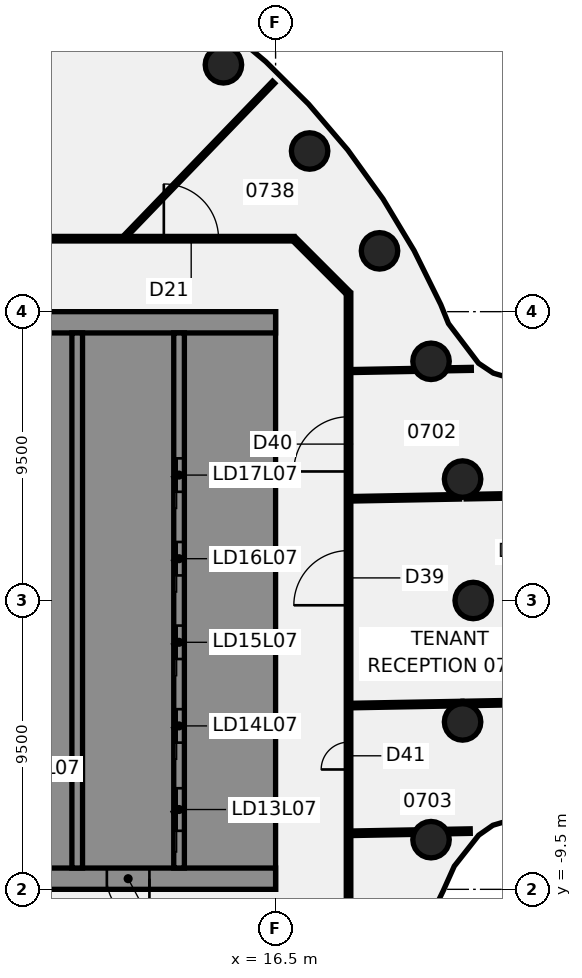
"""IFC4 building model, lengths in metres.
Left out: names, types, materials, properties, quantities, classifications, styles, units other than length and angle.
Written with IfcOpenShell. Run it as: python <this file> out.ifc"""

import sys

from ifc_helpers import new_model, si_unit, direction, frame, frame_2d, origin, origin_2d, place, context, subcontext, project, spatial, polyline, rectangle, circle, outline, extrude, element, fill, save


model = new_model("IFC4")
c1 = context("Model", 3, precision=1e-05, world=origin(), true_north=direction((0.0, 1.0)))
c2 = subcontext(c1, "Body", "Model", "MODEL_VIEW")
j1 = project(units=[si_unit("LENGTHUNIT", "METRE"), si_unit("PLANEANGLEUNIT", "RADIAN")], contexts=[c1])
p1 = place(None, origin())
s1 = spatial("IfcSite", under=j1, at=p1, CompositionType="ELEMENT")
p2 = place(p1, origin())
s2 = spatial("IfcBuilding", under=s1, at=p2, CompositionType="ELEMENT")
p3 = place(p2, frame((0.0, 0.0, 37.75)))
s3 = spatial("IfcBuildingStorey", under=s2, at=p3, CompositionType="ELEMENT", Elevation=37.75)
for number, where, z_axis, x_axis in (
    (1, (23.0, 0.0, -0.14), (0.0, 0.0, 1.0), (1.0, 0.0, 0.0)),
    (2, (22.651, 3.994, -0.14), (0.0, 0.0, 1.0), (1.0, 0.0, 0.0)),
    (3, (21.613, 7.866, -0.14), (0.0, 0.0, 1.0), (1.0, 0.0, 0.0)),
    (4, (19.919, 11.5, -0.14), (0.0, 0.0, 1.0), (1.0, 0.0, 0.0)),
    (5, (17.619, 14.784, -0.14), (0.0, 0.0, 1.0), (1.0, 0.0, 0.0)),
    (6, (14.784, 17.619, -0.14), (0.0, 0.0, 1.0), (1.0, 0.0, 0.0)),
    (7, (21.613, -7.866, -0.14), (0.0, 0.0, 1.0), (1.0, 0.0, 0.0)),
    (8, (22.651, -3.994, -0.14), (0.0, 0.0, 1.0), (1.0, 0.0, 0.0)),
):
    element("IfcColumn", number, at=place(p3, frame(where, z_axis=z_axis, x_axis=x_axis)), inside=s3, PredefinedType="COLUMN", context=c2, shape_type="SweptSolid", body=[
        extrude(circle(Radius=0.6, at=origin_2d()), origin(), (0.0, 0.0, 1.0), 3.75),
    ])
p4 = place(p3, frame((17.128, 11.872, 0.0), z_axis=(0.0, 0.0, 1.0), x_axis=(0.707106781187, -0.707106781187, 0.0)))
e9 = element("IfcWall", 9, at=p4, inside=s3, PredefinedType="PARTITIONING", context=c2, shape_type="SweptSolid", body=[
    extrude(rectangle(XDim=2.465, YDim=0.15, at=frame_2d((1.232, 0.0))), origin(), (0.0, 0.0, 1.0), 3.01),
])
p5 = place(p3, frame((-17.065, 11.9, 0.0), z_axis=(0.0, 0.0, 1.0), x_axis=(1.0, 0.0, 0.0)))
e10 = element("IfcWall", 10, at=p5, inside=s3, PredefinedType="PARTITIONING", context=c2, shape_type="SweptSolid", body=[
    extrude(rectangle(XDim=34.165, YDim=0.15, at=frame_2d((17.083, 0.0))), origin(), (0.0, 0.0, 1.0), 3.01),
])
p6 = place(p5, frame((16.399, 0.0, 0.0)))
e11 = element("IfcOpeningElement", 11, at=p6, cuts=e10, PredefinedType="OPENING", context=c2, shape_type="SweptSolid", body=[
    extrude(rectangle(XDim=1.8, YDim=2.1, at=frame_2d((0.9, 1.05))), frame((0.0, 0.085, 0.0), z_axis=(0.0, -1.0, 0.0), x_axis=(1.0, 0.0, 0.0)), (0.0, 0.0, 1.0), 0.17),
])
p7 = place(p5, frame((29.889, 0.0, 0.0)))
e12 = element("IfcOpeningElement", 12, at=p7, cuts=e10, PredefinedType="OPENING", context=c2, shape_type="SweptSolid", body=[
    extrude(rectangle(XDim=1.8, YDim=2.1, at=frame_2d((0.9, 1.05))), frame((0.0, 0.085, 0.0), z_axis=(0.0, -1.0, 0.0), x_axis=(1.0, 0.0, 0.0)), (0.0, 0.0, 1.0), 0.17),
])
p8 = place(p5, frame((6.823, 0.0, 0.0)))
e13 = element("IfcOpeningElement", 13, at=p8, cuts=e10, PredefinedType="OPENING", context=c2, shape_type="SweptSolid", body=[
    extrude(rectangle(XDim=1.8, YDim=2.1, at=frame_2d((0.9, 1.05))), frame((0.0, 0.085, 0.0), z_axis=(0.0, -1.0, 0.0), x_axis=(1.0, 0.0, 0.0)), (0.0, 0.0, 1.0), 0.17),
])
p9 = place(p3, frame((18.96, -3.456, 0.0), z_axis=(0.0, 0.0, 1.0), x_axis=(0.999834091985, 0.01821506258, 0.0)))
e14 = element("IfcWall", 14, at=p9, inside=s3, PredefinedType="PARTITIONING", context=c2, shape_type="SweptSolid", body=[
    extrude(rectangle(XDim=3.672, YDim=0.15, at=frame_2d((1.836, 0.0))), origin(), (0.0, 0.0, 1.0), 3.01),
])
p10 = place(p3, frame((22.667, -3.388, 0.0), z_axis=(0.0, 0.0, 1.0), x_axis=(0.999834076392, 0.018215918464, 0.0)))
e15 = element("IfcWall", 15, at=p10, inside=s3, PredefinedType="PARTITIONING", context=c2, shape_type="SweptSolid", body=[
    extrude(rectangle(XDim=3.109, YDim=0.15, at=frame_2d((1.555, 0.0))), origin(), (0.0, 0.0, 1.0), 3.01),
])
p11 = place(p3, frame((18.96, 3.345, 0.0), z_axis=(0.0, 0.0, 1.0), x_axis=(0.999833986919, 0.018220828811, 0.0)))
e16 = element("IfcWall", 16, at=p11, inside=s3, PredefinedType="PARTITIONING", context=c2, shape_type="SweptSolid", body=[
    extrude(rectangle(XDim=3.591, YDim=0.15, at=frame_2d((1.795, 0.0))), origin(), (0.0, 0.0, 1.0), 3.01),
])
p12 = place(p3, frame((22.765, 3.415, 0.0), z_axis=(0.0, 0.0, 1.0), x_axis=(0.999834723768, 0.01818035061, 0.0)))
e17 = element("IfcWall", 17, at=p12, inside=s3, PredefinedType="PARTITIONING", context=c2, shape_type="SweptSolid", body=[
    extrude(rectangle(XDim=2.887, YDim=0.15, at=frame_2d((1.444, 0.0))), origin(), (0.0, 0.0, 1.0), 3.01),
])
p13 = place(p3, frame((18.96, 7.546, 0.0), z_axis=(0.0, 0.0, 1.0), x_axis=(0.999836384885, 0.018088766124, 0.0)))
e18 = element("IfcWall", 18, at=p13, inside=s3, PredefinedType="PARTITIONING", context=c2, shape_type="SweptSolid", body=[
    extrude(rectangle(XDim=2.119, YDim=0.1, at=frame_2d((1.06, 0.0))), origin(), (0.0, 0.0, 1.0), 3.01),
])
p14 = place(p3, frame((22.153, 7.604, 0.0), z_axis=(0.0, 0.0, 1.0), x_axis=(0.999837513229, 0.01802629026, 0.0)))
e19 = element("IfcWall", 19, at=p14, inside=s3, PredefinedType="PARTITIONING", context=c2, shape_type="SweptSolid", body=[
    extrude(rectangle(XDim=0.786, YDim=0.1, at=frame_2d((0.393, 0.0))), origin(), (0.0, 0.0, 1.0), 3.01),
])
p15 = place(p3, frame((18.96, -7.657, 0.0), z_axis=(0.0, 0.0, 1.0), x_axis=(0.999832834064, 0.018283980067, 0.0)))
e20 = element("IfcWall", 20, at=p15, inside=s3, PredefinedType="PARTITIONING", context=c2, shape_type="SweptSolid", body=[
    extrude(rectangle(XDim=2.11, YDim=0.15, at=frame_2d((1.055, 0.0))), origin(), (0.0, 0.0, 1.0), 3.01),
])
p16 = place(p3, frame((22.151, -7.599, 0.0), z_axis=(0.0, 0.0, 1.0), x_axis=(0.999834536949, 0.018190621855, 0.0)))
e21 = element("IfcWall", 21, at=p16, inside=s3, PredefinedType="PARTITIONING", context=c2, shape_type="SweptSolid", body=[
    extrude(rectangle(XDim=0.752, YDim=0.15, at=frame_2d((0.376, 0.0))), origin(), (0.0, 0.0, 1.0), 3.01),
])
p17 = place(p3, frame((11.565, 11.993, 0.0), z_axis=(0.0, 0.0, 1.0), x_axis=(0.694132350754, 0.719847400243, 0.0)))
e22 = element("IfcWall", 22, at=p17, inside=s3, PredefinedType="PARTITIONING", context=c2, shape_type="SweptSolid", body=[
    extrude(rectangle(XDim=7.016, YDim=0.1, at=frame_2d((3.508, 0.0))), origin(), (0.0, 0.0, 1.0), 3.01),
])
p18 = place(p3, frame((18.9, -10.1, 0.0), z_axis=(0.0, 0.0, 1.0), x_axis=(0.0, 1.0, 0.0)))
e23 = element("IfcWall", 23, at=p18, inside=s3, PredefinedType="PARTITIONING", context=c2, shape_type="SweptSolid", body=[
    extrude(rectangle(XDim=20.2, YDim=0.15, at=frame_2d((10.1, 0.0))), origin(), (0.0, 0.0, 1.0), 3.01),
])
p19 = place(p18, frame((9.943, 0.0, 0.0)))
e24 = element("IfcOpeningElement", 24, at=p19, cuts=e23, PredefinedType="OPENING", context=c2, shape_type="SweptSolid", body=[
    extrude(rectangle(XDim=1.8, YDim=2.1, at=frame_2d((0.9, 1.05))), frame((0.0, 0.085, 0.0), z_axis=(0.0, -1.0, 0.0), x_axis=(1.0, 0.0, 0.0)), (0.0, 0.0, 1.0), 0.17),
])
p20 = place(p18, frame((14.344, 0.0, 0.0)))
e25 = element("IfcOpeningElement", 25, at=p20, cuts=e23, PredefinedType="OPENING", context=c2, shape_type="SweptSolid", body=[
    extrude(rectangle(XDim=1.8, YDim=2.1, at=frame_2d((0.9, 1.05))), frame((0.0, 0.085, 0.0), z_axis=(0.0, -1.0, 0.0), x_axis=(1.0, 0.0, 0.0)), (0.0, 0.0, 1.0), 0.17),
])
p21 = place(p18, frame((4.542, 0.0, 0.0)))
e26 = element("IfcOpeningElement", 26, at=p21, cuts=e23, PredefinedType="OPENING", context=c2, shape_type="SweptSolid", body=[
    extrude(rectangle(XDim=0.9, YDim=2.1, at=frame_2d((0.45, 1.05))), frame((0.0, 0.085, 0.0), z_axis=(0.0, -1.0, 0.0), x_axis=(1.0, 0.0, 0.0)), (0.0, 0.0, 1.0), 0.17),
])
p22 = place(p3, frame((16.5, -9.15, 0.0), z_axis=(0.0, 0.0, 1.0), x_axis=(-1.0, 0.0, 0.0)))
e27 = element("IfcWall", 27, at=p22, inside=s3, PredefinedType="SHEAR", context=c2, shape_type="SweptSolid", body=[
    extrude(rectangle(XDim=13.0, YDim=0.7, at=frame_2d((6.5, 0.0))), origin(), (0.0, 0.0, 1.0), 3.61),
])
p23 = place(p22, frame((4.15, 0.0, 0.0)))
e28 = element("IfcOpeningElement", 28, at=p23, cuts=e27, PredefinedType="OPENING", context=c2, shape_type="SweptSolid", body=[
    extrude(rectangle(XDim=1.4, YDim=2.1, at=frame_2d((0.7, 1.05))), frame((0.0, 0.36, 0.0), z_axis=(0.0, -1.0, 0.0), x_axis=(1.0, 0.0, 0.0)), (0.0, 0.0, 1.0), 0.72),
])
p24 = place(p22, frame((10.125, 0.0, 0.0)))
e29 = element("IfcOpeningElement", 29, at=p24, cuts=e27, PredefinedType="OPENING", context=c2, shape_type="SweptSolid", body=[
    extrude(rectangle(XDim=1.4, YDim=2.1, at=frame_2d((0.7, 1.05))), frame((0.0, 0.36, 0.0), z_axis=(0.0, -1.0, 0.0), x_axis=(1.0, 0.0, 0.0)), (0.0, 0.0, 1.0), 0.72),
])
p25 = place(p3, origin())
e30 = element("IfcWall", 30, at=p25, inside=s3, PredefinedType="SHEAR", context=c2, shape_type="SweptSolid", body=[
    extrude(outline(polyline([(13.5, -8.8), (15.8, -8.8), (16.5, -8.8), (16.5, 8.8), (15.8, 8.8), (13.5, 8.8), (13.5, 8.125), (15.8, 8.125), (15.8, 5.625), (13.5, 5.625), (13.5, 5.375), (15.8, 5.375), (15.8, 2.875), (13.5, 2.875), (13.5, 2.625), (15.8, 2.625), (15.8, 0.125), (13.5, 0.125), (13.5, -0.125), (15.8, -0.125), (15.8, -2.625), (13.5, -2.625), (13.5, -2.875), (15.8, -2.875), (15.8, -5.375), (13.5, -5.375), (13.5, -5.625), (15.8, -5.625), (15.8, -8.125), (13.5, -8.125), (13.5, -8.8)])), origin(), (0.0, 0.0, 1.0), 3.61),
])
p26 = place(p3, frame((16.5, 9.15, 0.0), z_axis=(0.0, 0.0, 1.0), x_axis=(-1.0, 0.0, 0.0)))
e31 = element("IfcWall", 31, at=p26, inside=s3, PredefinedType="SHEAR", context=c2, shape_type="SweptSolid", body=[
    extrude(rectangle(XDim=13.0, YDim=0.7, at=frame_2d((6.5, 0.0))), origin(), (0.0, 0.0, 1.0), 3.61),
])
p27 = place(p3, origin())
e32 = element("IfcWall", 32, at=p27, inside=s3, PredefinedType="SHEAR", context=c2, shape_type="SweptSolid", body=[
    extrude(outline(polyline([(9.8, -5.375), (7.5, -5.375), (7.5, -2.875), (9.8, -2.875), (9.8, -2.625), (7.5, -2.625), (7.5, -0.125), (9.8, -0.125), (9.8, 0.125), (7.5, 0.125), (7.5, 2.625), (9.8, 2.625), (9.8, 2.875), (7.5, 2.875), (7.5, 5.375), (9.8, 5.375), (9.8, 5.625), (7.5, 5.625), (7.5, 8.125), (9.8, 8.125), (9.8, 8.8), (7.5, 8.8), (7.15, 8.8), (7.15, -5.625), (7.5, -5.625), (9.8, -5.625), (9.8, -5.375)])), origin(), (0.0, 0.0, 1.0), 3.61),
])
p28 = place(p3, origin())
e33 = element("IfcWall", 33, at=p28, inside=s3, PredefinedType="SHEAR", context=c2, shape_type="SweptSolid", body=[
    extrude(outline(polyline([(7.5, -8.125), (7.5, -8.8), (9.8, -8.8), (9.8, -8.125), (9.8, -5.625), (9.55, -5.625), (9.55, -8.125), (7.5, -8.125)])), origin(), (0.0, 0.0, 1.0), 3.61),
])
p29 = place(p3, frame((13.325, -8.8, 0.0), z_axis=(0.0, 0.0, 1.0), x_axis=(0.0, 1.0, 0.0)))
e34 = element("IfcWall", 34, at=p29, inside=s3, PredefinedType="SHEAR", context=c2, shape_type="SweptSolid", body=[
    extrude(rectangle(XDim=17.6, YDim=0.35, at=frame_2d((8.8, 0.0))), origin(), (0.0, 0.0, 1.0), 3.61),
])
p30 = place(p29, frame((1.225, 0.0, 0.0)))
e35 = element("IfcOpeningElement", 35, at=p30, cuts=e34, PredefinedType="OPENING", context=c2, shape_type="SweptSolid", body=[
    extrude(rectangle(XDim=1.4, YDim=2.1, at=frame_2d((0.7, 1.05))), frame((0.0, 0.185, 0.0), z_axis=(0.0, -1.0, 0.0), x_axis=(1.0, 0.0, 0.0)), (0.0, 0.0, 1.0), 0.37),
])
p31 = place(p29, frame((4.125, 0.0, 0.0)))
e36 = element("IfcOpeningElement", 36, at=p31, cuts=e34, PredefinedType="OPENING", context=c2, shape_type="SweptSolid", body=[
    extrude(rectangle(XDim=1.1, YDim=2.1, at=frame_2d((0.55, 1.05))), frame((0.0, 0.185, 0.0), z_axis=(0.0, -1.0, 0.0), x_axis=(1.0, 0.0, 0.0)), (0.0, 0.0, 1.0), 0.37),
])
p32 = place(p29, frame((6.875, 0.0, 0.0)))
e37 = element("IfcOpeningElement", 37, at=p32, cuts=e34, PredefinedType="OPENING", context=c2, shape_type="SweptSolid", body=[
    extrude(rectangle(XDim=1.1, YDim=2.1, at=frame_2d((0.55, 1.05))), frame((0.0, 0.185, 0.0), z_axis=(0.0, -1.0, 0.0), x_axis=(1.0, 0.0, 0.0)), (0.0, 0.0, 1.0), 0.37),
])
p33 = place(p29, frame((9.625, 0.0, 0.0)))
e38 = element("IfcOpeningElement", 38, at=p33, cuts=e34, PredefinedType="OPENING", context=c2, shape_type="SweptSolid", body=[
    extrude(rectangle(XDim=1.1, YDim=2.1, at=frame_2d((0.55, 1.05))), frame((0.0, 0.185, 0.0), z_axis=(0.0, -1.0, 0.0), x_axis=(1.0, 0.0, 0.0)), (0.0, 0.0, 1.0), 0.37),
])
p34 = place(p29, frame((12.375, 0.0, 0.0)))
e39 = element("IfcOpeningElement", 39, at=p34, cuts=e34, PredefinedType="OPENING", context=c2, shape_type="SweptSolid", body=[
    extrude(rectangle(XDim=1.1, YDim=2.1, at=frame_2d((0.55, 1.05))), frame((0.0, 0.185, 0.0), z_axis=(0.0, -1.0, 0.0), x_axis=(1.0, 0.0, 0.0)), (0.0, 0.0, 1.0), 0.37),
])
p35 = place(p3, frame((9.975, -8.8, 0.0), z_axis=(0.0, 0.0, 1.0), x_axis=(0.0, 1.0, 0.0)))
e40 = element("IfcWall", 40, at=p35, inside=s3, PredefinedType="SHEAR", context=c2, shape_type="SweptSolid", body=[
    extrude(rectangle(XDim=17.6, YDim=0.35, at=frame_2d((8.8, 0.0))), origin(), (0.0, 0.0, 1.0), 3.61),
])
p36 = place(p7, origin())
e41 = element("IfcDoor", 41, at=p36, inside=s3, OperationType="DOUBLE_DOOR_SINGLE_SWING", PredefinedType="DOOR", context=c2, shape_type="SweptSolid", body=[
    extrude(rectangle(XDim=1.8, YDim=2.1, at=frame_2d((0.9, 1.05))), frame((0.0, 0.025, 0.0), z_axis=(0.0, -1.0, 0.0), x_axis=(1.0, 0.0, 0.0)), (0.0, 0.0, 1.0), 0.05),
])
fill(e12, e41)
p37 = place(p19, origin())
e42 = element("IfcDoor", 42, at=p37, inside=s3, OperationType="DOUBLE_DOOR_SINGLE_SWING", PredefinedType="DOOR", context=c2, shape_type="SweptSolid", body=[
    extrude(rectangle(XDim=1.8, YDim=2.1, at=frame_2d((0.9, 1.05))), frame((0.0, 0.025, 0.0), z_axis=(0.0, -1.0, 0.0), x_axis=(1.0, 0.0, 0.0)), (0.0, 0.0, 1.0), 0.05),
])
fill(e24, e42)
p38 = place(p20, frame((1.8, 0.0, 0.0), z_axis=(0.0, 0.0, 1.0), x_axis=(-1.0, 0.0, 0.0)))
e43 = element("IfcDoor", 43, at=p38, inside=s3, OperationType="DOUBLE_DOOR_SINGLE_SWING", PredefinedType="DOOR", context=c2, shape_type="SweptSolid", body=[
    extrude(rectangle(XDim=1.8, YDim=2.1, at=frame_2d((0.9, 1.05))), frame((0.0, 0.025, 0.0), z_axis=(0.0, -1.0, 0.0), x_axis=(1.0, 0.0, 0.0)), (0.0, 0.0, 1.0), 0.05),
])
fill(e25, e43)
p39 = place(p21, frame((0.9, 0.0, 0.0), z_axis=(0.0, 0.0, 1.0), x_axis=(-1.0, 0.0, 0.0)))
e44 = element("IfcDoor", 44, at=p39, inside=s3, OperationType="SINGLE_SWING_LEFT", PredefinedType="DOOR", context=c2, shape_type="SweptSolid", body=[
    extrude(rectangle(XDim=0.9, YDim=2.1, at=frame_2d((0.45, 1.05))), frame((0.0, 0.025, 0.0), z_axis=(0.0, -1.0, 0.0), x_axis=(1.0, 0.0, 0.0)), (0.0, 0.0, 1.0), 0.05),
])
fill(e26, e44)
p40 = place(p23, origin())
e45 = element("IfcDoor", 45, at=p40, inside=s3, OperationType="SINGLE_SWING_LEFT", PredefinedType="DOOR", context=c2, shape_type="SweptSolid", body=[
    extrude(rectangle(XDim=1.4, YDim=2.1, at=frame_2d((0.7, 1.05))), frame((0.0, 0.025, 0.0), z_axis=(0.0, -1.0, 0.0), x_axis=(1.0, 0.0, 0.0)), (0.0, 0.0, 1.0), 0.05),
])
fill(e28, e45)
p41 = place(p30, origin())
e46 = element("IfcDoor", 46, at=p41, inside=s3, OperationType="SLIDING_TO_LEFT", PredefinedType="DOOR", context=c2, shape_type="SweptSolid", body=[
    extrude(rectangle(XDim=1.4, YDim=2.1, at=frame_2d((0.7, 1.05))), frame((0.0, 0.025, 0.0), z_axis=(0.0, -1.0, 0.0), x_axis=(1.0, 0.0, 0.0)), (0.0, 0.0, 1.0), 0.05),
])
fill(e35, e46)
p42 = place(p31, origin())
e47 = element("IfcDoor", 47, at=p42, inside=s3, OperationType="SLIDING_TO_LEFT", PredefinedType="DOOR", context=c2, shape_type="SweptSolid", body=[
    extrude(rectangle(XDim=1.1, YDim=2.1, at=frame_2d((0.55, 1.05))), frame((0.0, 0.025, 0.0), z_axis=(0.0, -1.0, 0.0), x_axis=(1.0, 0.0, 0.0)), (0.0, 0.0, 1.0), 0.05),
])
fill(e36, e47)
p43 = place(p32, origin())
e48 = element("IfcDoor", 48, at=p43, inside=s3, OperationType="SLIDING_TO_LEFT", PredefinedType="DOOR", context=c2, shape_type="SweptSolid", body=[
    extrude(rectangle(XDim=1.1, YDim=2.1, at=frame_2d((0.55, 1.05))), frame((0.0, 0.025, 0.0), z_axis=(0.0, -1.0, 0.0), x_axis=(1.0, 0.0, 0.0)), (0.0, 0.0, 1.0), 0.05),
])
fill(e37, e48)
p44 = place(p33, origin())
e49 = element("IfcDoor", 49, at=p44, inside=s3, OperationType="SLIDING_TO_LEFT", PredefinedType="DOOR", context=c2, shape_type="SweptSolid", body=[
    extrude(rectangle(XDim=1.1, YDim=2.1, at=frame_2d((0.55, 1.05))), frame((0.0, 0.025, 0.0), z_axis=(0.0, -1.0, 0.0), x_axis=(1.0, 0.0, 0.0)), (0.0, 0.0, 1.0), 0.05),
])
fill(e38, e49)
p45 = place(p34, origin())
e50 = element("IfcDoor", 50, at=p45, inside=s3, OperationType="SLIDING_TO_LEFT", PredefinedType="DOOR", context=c2, shape_type="SweptSolid", body=[
    extrude(rectangle(XDim=1.1, YDim=2.1, at=frame_2d((0.55, 1.05))), frame((0.0, 0.025, 0.0), z_axis=(0.0, -1.0, 0.0), x_axis=(1.0, 0.0, 0.0)), (0.0, 0.0, 1.0), 0.05),
])
fill(e39, e50)
save(model, sys.argv[1])
